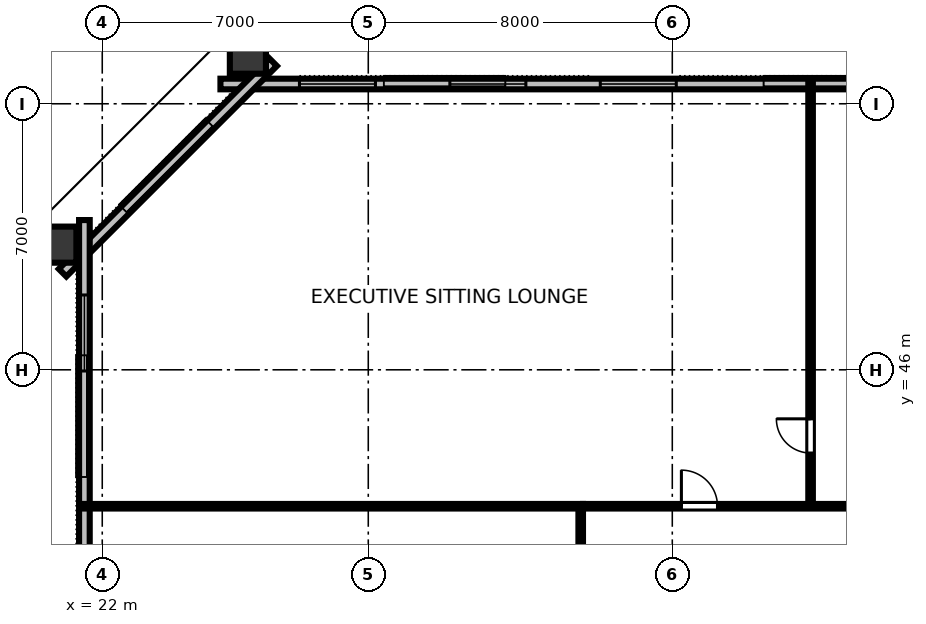
"""IFC4 building model, lengths in metres.
Left out: names, types, materials, properties, quantities, classifications, styles, units other than length and angle.
Written with IfcOpenShell. Run it as: python <this file> out.ifc"""

import sys

from ifc_helpers import new_model, si_unit, direction, frame, frame_2d, origin, origin_2d, place, context, subcontext, project, spatial, rectangle, hollow_rectangle, extrude, element, fill, save


model = new_model("IFC4")
c1 = context("Model", 3, precision=1e-05, world=origin(), true_north=direction((0.0, 1.0)))
c2 = subcontext(c1, "Body", "Model", "MODEL_VIEW")
j1 = project(units=[si_unit("LENGTHUNIT", "METRE"), si_unit("PLANEANGLEUNIT", "RADIAN")], contexts=[c1])
p1 = place(None, origin())
s1 = spatial("IfcSite", under=j1, at=p1, CompositionType="ELEMENT")
p2 = place(p1, origin())
s2 = spatial("IfcBuilding", under=s1, at=p2, CompositionType="ELEMENT")
p3 = place(p2, frame((0.0, 0.0, 64.0)))
s3 = spatial("IfcBuildingStorey", under=s2, at=p3, CompositionType="ELEMENT", Elevation=64.0)
for number, where, z_axis, x_axis in (
    (1, (25.832, 54.365, 0.0), (0.0, 0.0, 1.0), (1.0, 0.0, 0.0)),
    (2, (20.744, 49.293, 0.0), (0.0, 0.0, 1.0), (0.0, 1.0, 0.0)),
):
    element("IfcColumn", number, at=place(p3, frame(where, z_axis=z_axis, x_axis=x_axis)), inside=s3, PredefinedType="COLUMN", context=c2, shape_type="SweptSolid", body=[
        extrude(hollow_rectangle(XDim=0.95, YDim=1.15, WallThickness=0.06, at=origin_2d()), origin(), (0.0, 0.0, 1.0), 3.358),
    ])
p4 = place(p3, frame((66.89, 53.52, 0.0), z_axis=(0.0, 0.0, 1.0), x_axis=(-1.0, 0.0, 0.0)))
e3 = element("IfcWall", 3, at=p4, inside=s3, PredefinedType="STANDARD", context=c2, shape_type="SweptSolid", body=[
    extrude(rectangle(XDim=41.78, YDim=0.28, at=frame_2d((20.89, 0.0))), origin(), (0.0, 0.0, 1.0), 3.36),
])
p5 = place(p4, frame((2.079, 0.0, 0.8)))
e4 = element("IfcOpeningElement", 4, at=p5, cuts=e3, PredefinedType="OPENING", context=c2, shape_type="SweptSolid", body=[
    extrude(rectangle(XDim=2.0, YDim=1.95, at=frame_2d((1.0, 0.975))), frame((0.0, 0.15, 0.0), z_axis=(0.0, -1.0, 0.0), x_axis=(1.0, 0.0, 0.0)), (0.0, 0.0, 1.0), 0.3),
])
p6 = place(p4, frame((6.037, 0.0, 0.8)))
e5 = element("IfcOpeningElement", 5, at=p6, cuts=e3, PredefinedType="OPENING", context=c2, shape_type="SweptSolid", body=[
    extrude(rectangle(XDim=2.0, YDim=1.95, at=frame_2d((1.0, 0.975))), frame((0.0, 0.15, 0.0), z_axis=(0.0, -1.0, 0.0), x_axis=(1.0, 0.0, 0.0)), (0.0, 0.0, 1.0), 0.3),
])
p7 = place(p4, frame((9.995, 0.0, 0.8)))
e6 = element("IfcOpeningElement", 6, at=p7, cuts=e3, PredefinedType="OPENING", context=c2, shape_type="SweptSolid", body=[
    extrude(rectangle(XDim=2.0, YDim=1.95, at=frame_2d((1.0, 0.975))), frame((0.0, 0.15, 0.0), z_axis=(0.0, -1.0, 0.0), x_axis=(1.0, 0.0, 0.0)), (0.0, 0.0, 1.0), 0.3),
])
p8 = place(p4, frame((29.785, 0.0, 0.8)))
e7 = element("IfcOpeningElement", 7, at=p8, cuts=e3, PredefinedType="OPENING", context=c2, shape_type="SweptSolid", body=[
    extrude(rectangle(XDim=2.0, YDim=1.95, at=frame_2d((1.0, 0.975))), frame((0.0, 0.15, 0.0), z_axis=(0.0, -1.0, 0.0), x_axis=(1.0, 0.0, 0.0)), (0.0, 0.0, 1.0), 0.3),
])
p9 = place(p4, frame((33.743, 0.0, 0.8)))
e8 = element("IfcOpeningElement", 8, at=p9, cuts=e3, PredefinedType="OPENING", context=c2, shape_type="SweptSolid", body=[
    extrude(rectangle(XDim=2.0, YDim=1.95, at=frame_2d((1.0, 0.975))), frame((0.0, 0.15, 0.0), z_axis=(0.0, -1.0, 0.0), x_axis=(1.0, 0.0, 0.0)), (0.0, 0.0, 1.0), 0.3),
])
p10 = place(p4, frame((37.701, 0.0, 0.8)))
e9 = element("IfcOpeningElement", 9, at=p10, cuts=e3, PredefinedType="OPENING", context=c2, shape_type="SweptSolid", body=[
    extrude(rectangle(XDim=2.0, YDim=1.95, at=frame_2d((1.0, 0.975))), frame((0.0, 0.15, 0.0), z_axis=(0.0, -1.0, 0.0), x_axis=(1.0, 0.0, 0.0)), (0.0, 0.0, 1.0), 0.3),
])
p11 = place(p3, frame((26.496, 54.094, 0.0), z_axis=(0.0, 0.0, 1.0), x_axis=(-0.707106781187, -0.707106781187, 0.0)))
e10 = element("IfcWall", 10, at=p11, inside=s3, PredefinedType="STANDARD", context=c2, shape_type="SweptSolid", body=[
    extrude(rectangle(XDim=7.834, YDim=0.28, at=frame_2d((3.917, 0.0))), origin(), (0.0, 0.0, 1.0), 3.36),
])
p12 = place(p3, frame((21.53, 49.94, 0.0), z_axis=(0.0, 0.0, 1.0), x_axis=(0.0, -1.0, 0.0)))
e11 = element("IfcWall", 11, at=p12, inside=s3, PredefinedType="STANDARD", context=c2, shape_type="SweptSolid", body=[
    extrude(rectangle(XDim=35.88, YDim=0.28, at=frame_2d((17.94, 0.0))), origin(), (0.0, 0.0, 1.0), 3.36),
])
p13 = place(p12, frame((14.57, 0.0, 0.0)))
e12 = element("IfcOpeningElement", 12, at=p13, cuts=e11, PredefinedType="OPENING", context=c2, shape_type="SweptSolid", body=[
    extrude(rectangle(XDim=1.4, YDim=2.15, at=frame_2d((0.7, 1.075))), frame((0.0, 0.15, 0.0), z_axis=(0.0, -1.0, 0.0), x_axis=(1.0, 0.0, 0.0)), (0.0, 0.0, 1.0), 0.3),
])
p14 = place(p12, frame((1.971, 0.0, 0.8)))
e13 = element("IfcOpeningElement", 13, at=p14, cuts=e11, PredefinedType="OPENING", context=c2, shape_type="SweptSolid", body=[
    extrude(rectangle(XDim=2.0, YDim=1.95, at=frame_2d((1.0, 0.975))), frame((0.0, 0.15, 0.0), z_axis=(0.0, -1.0, 0.0), x_axis=(1.0, 0.0, 0.0)), (0.0, 0.0, 1.0), 0.3),
])
p15 = place(p12, frame((9.456, 0.0, 0.8)))
e14 = element("IfcOpeningElement", 14, at=p15, cuts=e11, PredefinedType="OPENING", context=c2, shape_type="SweptSolid", body=[
    extrude(rectangle(XDim=2.0, YDim=1.95, at=frame_2d((1.0, 0.975))), frame((0.0, 0.15, 0.0), z_axis=(0.0, -1.0, 0.0), x_axis=(1.0, 0.0, 0.0)), (0.0, 0.0, 1.0), 0.3),
])
p16 = place(p12, frame((20.682, 0.0, 0.8)))
e15 = element("IfcOpeningElement", 15, at=p16, cuts=e11, PredefinedType="OPENING", context=c2, shape_type="SweptSolid", body=[
    extrude(rectangle(XDim=2.0, YDim=1.95, at=frame_2d((1.0, 0.975))), frame((0.0, 0.15, 0.0), z_axis=(0.0, -1.0, 0.0), x_axis=(1.0, 0.0, 0.0)), (0.0, 0.0, 1.0), 0.3),
])
p17 = place(p12, frame((24.424, 0.0, 0.8)))
e16 = element("IfcOpeningElement", 16, at=p17, cuts=e11, PredefinedType="OPENING", context=c2, shape_type="SweptSolid", body=[
    extrude(rectangle(XDim=2.0, YDim=1.95, at=frame_2d((1.0, 0.975))), frame((0.0, 0.15, 0.0), z_axis=(0.0, -1.0, 0.0), x_axis=(1.0, 0.0, 0.0)), (0.0, 0.0, 1.0), 0.3),
])
p18 = place(p12, frame((31.909, 0.0, 0.8)))
e17 = element("IfcOpeningElement", 17, at=p18, cuts=e11, PredefinedType="OPENING", context=c2, shape_type="SweptSolid", body=[
    extrude(rectangle(XDim=2.0, YDim=1.95, at=frame_2d((1.0, 0.975))), frame((0.0, 0.15, 0.0), z_axis=(0.0, -1.0, 0.0), x_axis=(1.0, 0.0, 0.0)), (0.0, 0.0, 1.0), 0.3),
])
p19 = place(p3, frame((40.639, 42.41, 0.0), z_axis=(0.0, 0.0, 1.0), x_axis=(0.0, 1.0, 0.0)))
e18 = element("IfcWall", 18, at=p19, inside=s3, PredefinedType="PARTITIONING", context=c2, shape_type="SweptSolid", body=[
    extrude(rectangle(XDim=11.11, YDim=0.12, at=frame_2d((5.555, 0.0))), origin(), (0.0, 0.0, 1.0), 2.64),
])
p20 = place(p19, frame((1.4, 0.0, 0.0)))
e19 = element("IfcOpeningElement", 19, at=p20, cuts=e18, PredefinedType="OPENING", context=c2, shape_type="SweptSolid", body=[
    extrude(rectangle(XDim=0.9, YDim=2.15, at=frame_2d((0.45, 1.075))), frame((0.0, 0.07, 0.0), z_axis=(0.0, -1.0, 0.0), x_axis=(1.0, 0.0, 0.0)), (0.0, 0.0, 1.0), 0.14),
])
p21 = place(p3, frame((34.65, 42.41, 0.0), z_axis=(0.0, 0.0, 1.0), x_axis=(1.0, 0.0, 0.0)))
e20 = element("IfcWall", 20, at=p21, inside=s3, PredefinedType="PARTITIONING", context=c2, shape_type="SweptSolid", body=[
    extrude(rectangle(XDim=22.7, YDim=0.12, at=frame_2d((11.35, 0.0))), origin(), (0.0, 0.0, 1.0), 2.64),
])
p22 = place(p21, frame((2.59, 0.0, 0.0)))
e21 = element("IfcOpeningElement", 21, at=p22, cuts=e20, PredefinedType="OPENING", context=c2, shape_type="SweptSolid", body=[
    extrude(rectangle(XDim=0.95, YDim=2.15, at=frame_2d((0.475, 1.075))), frame((0.0, 0.07, 0.0), z_axis=(0.0, -1.0, 0.0), x_axis=(1.0, 0.0, 0.0)), (0.0, 0.0, 1.0), 0.14),
])
p23 = place(p21, frame((8.768, 0.0, 0.0)))
e22 = element("IfcOpeningElement", 22, at=p23, cuts=e20, PredefinedType="OPENING", context=c2, shape_type="SweptSolid", body=[
    extrude(rectangle(XDim=0.95, YDim=2.15, at=frame_2d((0.475, 1.075))), frame((0.0, 0.07, 0.0), z_axis=(0.0, -1.0, 0.0), x_axis=(1.0, 0.0, 0.0)), (0.0, 0.0, 1.0), 0.14),
])
p24 = place(p21, frame((14.079, 0.0, 0.0)))
e23 = element("IfcOpeningElement", 23, at=p24, cuts=e20, PredefinedType="OPENING", context=c2, shape_type="SweptSolid", body=[
    extrude(rectangle(XDim=0.95, YDim=2.15, at=frame_2d((0.475, 1.075))), frame((0.0, 0.07, 0.0), z_axis=(0.0, -1.0, 0.0), x_axis=(1.0, 0.0, 0.0)), (0.0, 0.0, 1.0), 0.14),
])
p25 = place(p21, frame((19.11, 0.0, 0.0)))
e24 = element("IfcOpeningElement", 24, at=p25, cuts=e20, PredefinedType="OPENING", context=c2, shape_type="SweptSolid", body=[
    extrude(rectangle(XDim=0.95, YDim=2.15, at=frame_2d((0.475, 1.075))), frame((0.0, 0.07, 0.0), z_axis=(0.0, -1.0, 0.0), x_axis=(1.0, 0.0, 0.0)), (0.0, 0.0, 1.0), 0.14),
])
p26 = place(p3, frame((34.59, 21.65, 0.0), z_axis=(0.0, 0.0, 1.0), x_axis=(0.0, 1.0, 0.0)))
e25 = element("IfcWall", 25, at=p26, inside=s3, PredefinedType="PARTITIONING", context=c2, shape_type="SweptSolid", body=[
    extrude(rectangle(XDim=20.7, YDim=0.12, at=frame_2d((10.35, 0.0))), origin(), (0.0, 0.0, 1.0), 2.64),
])
p27 = place(p26, frame((6.696, 0.0, 0.0)))
e26 = element("IfcOpeningElement", 26, at=p27, cuts=e25, PredefinedType="OPENING", context=c2, shape_type="SweptSolid", body=[
    extrude(rectangle(XDim=0.95, YDim=2.15, at=frame_2d((0.475, 1.075))), frame((0.0, 0.07, 0.0), z_axis=(0.0, -1.0, 0.0), x_axis=(1.0, 0.0, 0.0)), (0.0, 0.0, 1.0), 0.14),
])
p28 = place(p26, frame((16.846, 0.0, 0.0)))
e27 = element("IfcOpeningElement", 27, at=p28, cuts=e25, PredefinedType="OPENING", context=c2, shape_type="SweptSolid", body=[
    extrude(rectangle(XDim=0.95, YDim=2.15, at=frame_2d((0.475, 1.075))), frame((0.0, 0.07, 0.0), z_axis=(0.0, -1.0, 0.0), x_axis=(1.0, 0.0, 0.0)), (0.0, 0.0, 1.0), 0.14),
])
p29 = place(p3, frame((34.65, 42.41, 0.0), z_axis=(0.0, 0.0, 1.0), x_axis=(-1.0, 0.0, 0.0)))
e28 = element("IfcWall", 28, at=p29, inside=s3, PredefinedType="PARTITIONING", context=c2, shape_type="SweptSolid", body=[
    extrude(rectangle(XDim=13.12, YDim=0.12, at=frame_2d((6.56, 0.0))), origin(), (0.0, 0.0, 1.0), 2.64),
])
p30 = place(p8, origin())
e29 = element("IfcWindow", 29, at=p30, inside=s3, PartitioningType="SINGLE_PANEL", PredefinedType="WINDOW", context=c2, shape_type="SweptSolid", body=[
    extrude(rectangle(XDim=2.0, YDim=1.95, at=frame_2d((1.0, 0.975))), frame((0.0, 0.03, 0.0), z_axis=(0.0, -1.0, 0.0), x_axis=(1.0, 0.0, 0.0)), (0.0, 0.0, 1.0), 0.06),
])
fill(e7, e29)
p31 = place(p9, origin())
e30 = element("IfcWindow", 30, at=p31, inside=s3, PartitioningType="SINGLE_PANEL", PredefinedType="WINDOW", context=c2, shape_type="SweptSolid", body=[
    extrude(rectangle(XDim=2.0, YDim=1.95, at=frame_2d((1.0, 0.975))), frame((0.0, 0.03, 0.0), z_axis=(0.0, -1.0, 0.0), x_axis=(1.0, 0.0, 0.0)), (0.0, 0.0, 1.0), 0.06),
])
fill(e8, e30)
p32 = place(p10, origin())
e31 = element("IfcWindow", 31, at=p32, inside=s3, PartitioningType="SINGLE_PANEL", PredefinedType="WINDOW", context=c2, shape_type="SweptSolid", body=[
    extrude(rectangle(XDim=2.0, YDim=1.95, at=frame_2d((1.0, 0.975))), frame((0.0, 0.03, 0.0), z_axis=(0.0, -1.0, 0.0), x_axis=(1.0, 0.0, 0.0)), (0.0, 0.0, 1.0), 0.06),
])
fill(e9, e31)
p33 = place(p14, origin())
e32 = element("IfcWindow", 32, at=p33, inside=s3, PartitioningType="SINGLE_PANEL", PredefinedType="WINDOW", context=c2, shape_type="SweptSolid", body=[
    extrude(rectangle(XDim=2.0, YDim=1.95, at=frame_2d((1.0, 0.975))), frame((0.0, 0.03, 0.0), z_axis=(0.0, -1.0, 0.0), x_axis=(1.0, 0.0, 0.0)), (0.0, 0.0, 1.0), 0.06),
])
fill(e13, e32)
p34 = place(p20, origin())
e33 = element("IfcDoor", 33, at=p34, inside=s3, OperationType="SINGLE_SWING_RIGHT", PredefinedType="DOOR", context=c2, shape_type="SweptSolid", body=[
    extrude(rectangle(XDim=0.9, YDim=2.15, at=frame_2d((0.45, 1.075))), frame((0.0, 0.025, 0.0), z_axis=(0.0, -1.0, 0.0), x_axis=(1.0, 0.0, 0.0)), (0.0, 0.0, 1.0), 0.05),
])
fill(e19, e33)
p35 = place(p22, origin())
e34 = element("IfcDoor", 34, at=p35, inside=s3, OperationType="SINGLE_SWING_LEFT", PredefinedType="DOOR", context=c2, shape_type="SweptSolid", body=[
    extrude(rectangle(XDim=0.95, YDim=2.15, at=frame_2d((0.475, 1.075))), frame((0.0, 0.025, 0.0), z_axis=(0.0, -1.0, 0.0), x_axis=(1.0, 0.0, 0.0)), (0.0, 0.0, 1.0), 0.05),
])
fill(e21, e34)
save(model, sys.argv[1])
